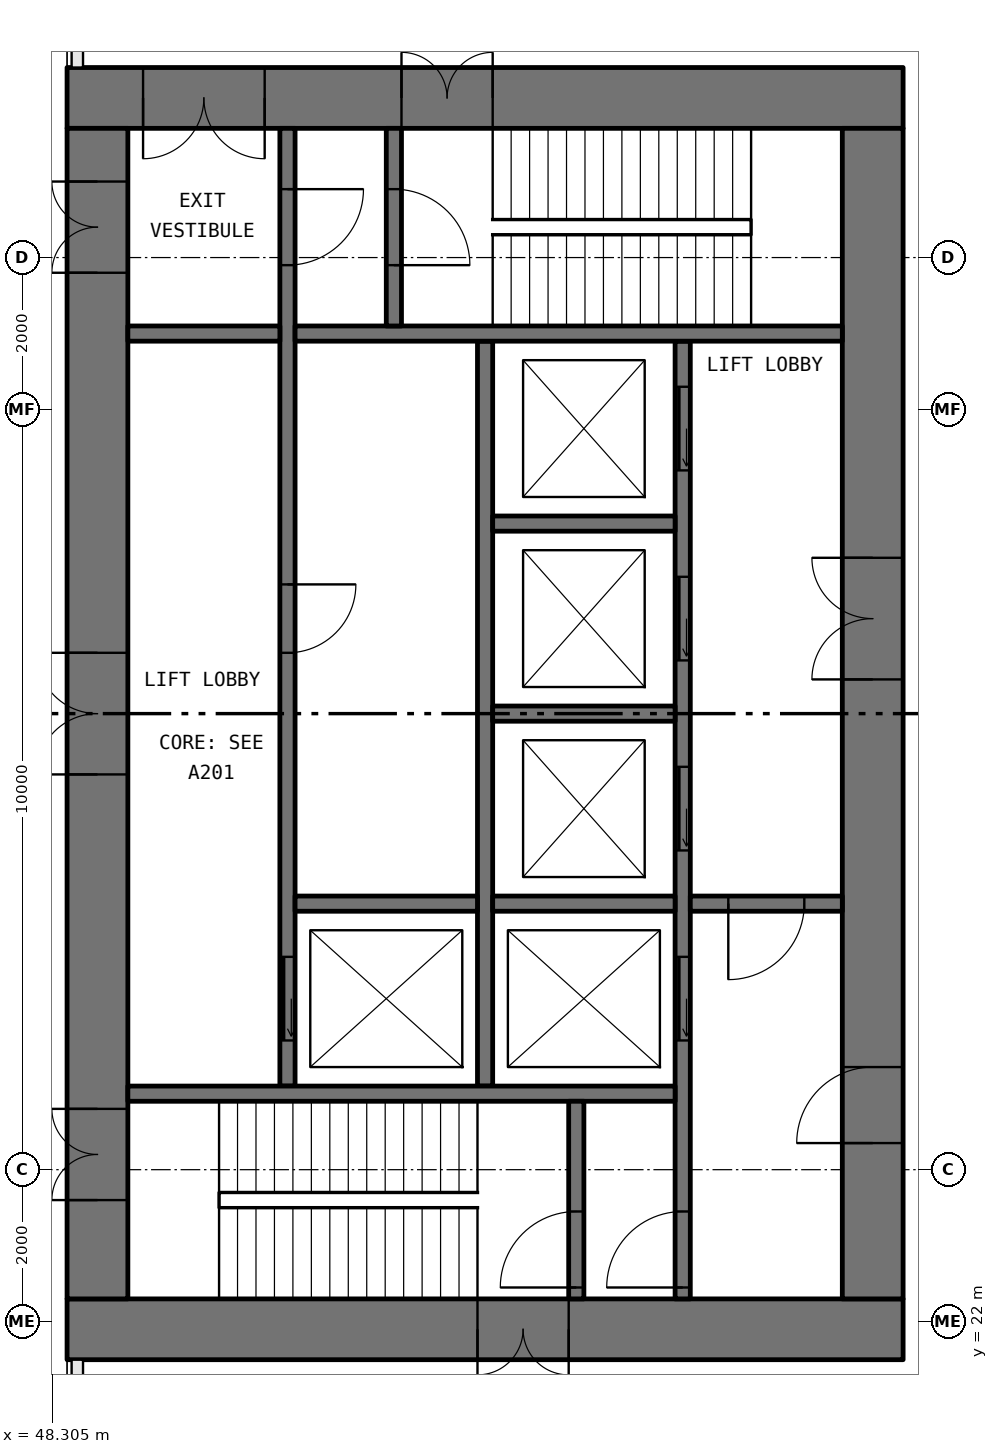
"""IFC4 building model, lengths in metres.
Left out: names, types, materials, properties, quantities, classifications, styles, units other than length and angle.
Written with IfcOpenShell. Run it as: python <this file> out.ifc"""

import sys

from ifc_helpers import new_model, si_unit, direction, frame, frame_2d, origin, place, context, subcontext, project, spatial, rectangle, extrude, element, fill, save


model = new_model("IFC4")
c1 = context("Model", 3, precision=1e-05, world=origin(), true_north=direction((0.0, 1.0)))
c2 = subcontext(c1, "Body", "Model", "MODEL_VIEW")
j1 = project(units=[si_unit("LENGTHUNIT", "METRE"), si_unit("PLANEANGLEUNIT", "RADIAN")], contexts=[c1])
p1 = place(None, origin())
s1 = spatial("IfcSite", under=j1, at=p1, CompositionType="ELEMENT")
p2 = place(p1, origin())
s2 = spatial("IfcBuilding", under=s1, at=p2, CompositionType="ELEMENT")
p3 = place(p2, origin())
s3 = spatial("IfcBuildingStorey", under=s2, at=p3, CompositionType="ELEMENT", Elevation=0.0)
p4 = place(p3, frame((59.5, 21.9, 0.0), z_axis=(0.0, 0.0, 1.0), x_axis=(-1.0, 0.0, 0.0)))
e1 = element("IfcWall", 1, at=p4, inside=s3, PredefinedType="SHEAR", context=c2, shape_type="SweptSolid", body=[
    extrude(rectangle(XDim=11.0, YDim=0.8, at=frame_2d((5.5, 0.0))), origin(), (0.0, 0.0, 1.0), 5.6),
])
p5 = place(p4, frame((4.4, 0.0, 0.0)))
e2 = element("IfcOpeningElement", 2, at=p5, cuts=e1, PredefinedType="OPENING", context=c2, shape_type="SweptSolid", body=[
    extrude(rectangle(XDim=1.2, YDim=2.1, at=frame_2d((0.6, 1.05))), frame((0.0, 0.41, 0.0), z_axis=(0.0, -1.0, 0.0), x_axis=(1.0, 0.0, 0.0)), (0.0, 0.0, 1.0), 0.82),
])
p6 = place(p3, frame((59.5, 38.1, 0.0), z_axis=(0.0, 0.0, 1.0), x_axis=(-1.0, 0.0, 0.0)))
e3 = element("IfcWall", 3, at=p6, inside=s3, PredefinedType="SHEAR", context=c2, shape_type="SweptSolid", body=[
    extrude(rectangle(XDim=11.0, YDim=0.8, at=frame_2d((5.5, 0.0))), origin(), (0.0, 0.0, 1.0), 5.6),
])
p7 = place(p6, frame((8.4, 0.0, 0.0)))
e4 = element("IfcOpeningElement", 4, at=p7, cuts=e3, PredefinedType="OPENING", context=c2, shape_type="SweptSolid", body=[
    extrude(rectangle(XDim=1.6, YDim=2.1, at=frame_2d((0.8, 1.05))), frame((0.0, 0.41, 0.0), z_axis=(0.0, -1.0, 0.0), x_axis=(1.0, 0.0, 0.0)), (0.0, 0.0, 1.0), 0.82),
])
p8 = place(p6, frame((5.4, 0.0, 0.0)))
e5 = element("IfcOpeningElement", 5, at=p8, cuts=e3, PredefinedType="OPENING", context=c2, shape_type="SweptSolid", body=[
    extrude(rectangle(XDim=1.2, YDim=2.1, at=frame_2d((0.6, 1.05))), frame((0.0, 0.41, 0.0), z_axis=(0.0, -1.0, 0.0), x_axis=(1.0, 0.0, 0.0)), (0.0, 0.0, 1.0), 0.82),
])
p9 = place(p3, frame((59.1, 22.3, 0.0), z_axis=(0.0, 0.0, 1.0), x_axis=(0.0, 1.0, 0.0)))
e6 = element("IfcWall", 6, at=p9, inside=s3, PredefinedType="SHEAR", context=c2, shape_type="SweptSolid", body=[
    extrude(rectangle(XDim=15.4, YDim=0.8, at=frame_2d((7.7, 0.0))), origin(), (0.0, 0.0, 1.0), 5.6),
])
p10 = place(p9, frame((8.15, 0.0, 0.0)))
e7 = element("IfcOpeningElement", 7, at=p10, cuts=e6, PredefinedType="OPENING", context=c2, shape_type="SweptSolid", body=[
    extrude(rectangle(XDim=1.6, YDim=2.1, at=frame_2d((0.8, 1.05))), frame((0.0, 0.41, 0.0), z_axis=(0.0, -1.0, 0.0), x_axis=(1.0, 0.0, 0.0)), (0.0, 0.0, 1.0), 0.82),
])
p11 = place(p9, frame((2.05, 0.0, 0.0)))
e8 = element("IfcOpeningElement", 8, at=p11, cuts=e6, PredefinedType="OPENING", context=c2, shape_type="SweptSolid", body=[
    extrude(rectangle(XDim=1.0, YDim=2.1, at=frame_2d((0.5, 1.05))), frame((0.0, 0.41, 0.0), z_axis=(0.0, -1.0, 0.0), x_axis=(1.0, 0.0, 0.0)), (0.0, 0.0, 1.0), 0.82),
])
p12 = place(p3, frame((48.9, 22.3, 0.0), z_axis=(0.0, 0.0, 1.0), x_axis=(0.0, 1.0, 0.0)))
e9 = element("IfcWall", 9, at=p12, inside=s3, PredefinedType="SHEAR", context=c2, shape_type="SweptSolid", body=[
    extrude(rectangle(XDim=15.4, YDim=0.8, at=frame_2d((7.7, 0.0))), origin(), (0.0, 0.0, 1.0), 5.6),
])
p13 = place(p12, frame((6.9, 0.0, 0.0)))
e10 = element("IfcOpeningElement", 10, at=p13, cuts=e9, PredefinedType="OPENING", context=c2, shape_type="SweptSolid", body=[
    extrude(rectangle(XDim=1.6, YDim=2.1, at=frame_2d((0.8, 1.05))), frame((0.0, 0.41, 0.0), z_axis=(0.0, -1.0, 0.0), x_axis=(1.0, 0.0, 0.0)), (0.0, 0.0, 1.0), 0.82),
])
p14 = place(p12, frame((1.3, 0.0, 0.0)))
e11 = element("IfcOpeningElement", 11, at=p14, cuts=e9, PredefinedType="OPENING", context=c2, shape_type="SweptSolid", body=[
    extrude(rectangle(XDim=1.2, YDim=2.1, at=frame_2d((0.6, 1.05))), frame((0.0, 0.41, 0.0), z_axis=(0.0, -1.0, 0.0), x_axis=(1.0, 0.0, 0.0)), (0.0, 0.0, 1.0), 0.82),
])
p15 = place(p12, frame((13.5, 0.0, 0.0)))
e12 = element("IfcOpeningElement", 12, at=p15, cuts=e9, PredefinedType="OPENING", context=c2, shape_type="SweptSolid", body=[
    extrude(rectangle(XDim=1.2, YDim=2.1, at=frame_2d((0.6, 1.05))), frame((0.0, 0.41, 0.0), z_axis=(0.0, -1.0, 0.0), x_axis=(1.0, 0.0, 0.0)), (0.0, 0.0, 1.0), 0.82),
])
p16 = place(p3, frame((56.6, 22.3, 0.0), z_axis=(0.0, 0.0, 1.0), x_axis=(0.0, 1.0, 0.0)))
e13 = element("IfcWall", 13, at=p16, inside=s3, PredefinedType="SOLIDWALL", context=c2, shape_type="SweptSolid", body=[
    extrude(rectangle(XDim=12.6, YDim=0.2, at=frame_2d((6.3, 0.0))), origin(), (0.0, 0.0, 1.0), 5.6),
])
p17 = place(p16, frame((3.4, 0.0, 0.0)))
e14 = element("IfcOpeningElement", 14, at=p17, cuts=e13, PredefinedType="OPENING", context=c2, shape_type="SweptSolid", body=[
    extrude(rectangle(XDim=1.1, YDim=2.1, at=frame_2d((0.55, 1.05))), frame((0.0, 0.11, 0.0), z_axis=(0.0, -1.0, 0.0), x_axis=(1.0, 0.0, 0.0)), (0.0, 0.0, 1.0), 0.22),
])
p18 = place(p16, frame((5.9, 0.0, 0.0)))
e15 = element("IfcOpeningElement", 15, at=p18, cuts=e13, PredefinedType="OPENING", context=c2, shape_type="SweptSolid", body=[
    extrude(rectangle(XDim=1.1, YDim=2.1, at=frame_2d((0.55, 1.05))), frame((0.0, 0.11, 0.0), z_axis=(0.0, -1.0, 0.0), x_axis=(1.0, 0.0, 0.0)), (0.0, 0.0, 1.0), 0.22),
])
p19 = place(p16, frame((8.4, 0.0, 0.0)))
e16 = element("IfcOpeningElement", 16, at=p19, cuts=e13, PredefinedType="OPENING", context=c2, shape_type="SweptSolid", body=[
    extrude(rectangle(XDim=1.1, YDim=2.1, at=frame_2d((0.55, 1.05))), frame((0.0, 0.11, 0.0), z_axis=(0.0, -1.0, 0.0), x_axis=(1.0, 0.0, 0.0)), (0.0, 0.0, 1.0), 0.22),
])
p20 = place(p16, frame((10.9, 0.0, 0.0)))
e17 = element("IfcOpeningElement", 17, at=p20, cuts=e13, PredefinedType="OPENING", context=c2, shape_type="SweptSolid", body=[
    extrude(rectangle(XDim=1.1, YDim=2.1, at=frame_2d((0.55, 1.05))), frame((0.0, 0.11, 0.0), z_axis=(0.0, -1.0, 0.0), x_axis=(1.0, 0.0, 0.0)), (0.0, 0.0, 1.0), 0.22),
])
p21 = place(p16, frame((0.15, 0.0, 0.0)))
e18 = element("IfcOpeningElement", 18, at=p21, cuts=e13, PredefinedType="OPENING", context=c2, shape_type="SweptSolid", body=[
    extrude(rectangle(XDim=1.0, YDim=2.1, at=frame_2d((0.5, 1.05))), frame((0.0, 0.11, 0.0), z_axis=(0.0, -1.0, 0.0), x_axis=(1.0, 0.0, 0.0)), (0.0, 0.0, 1.0), 0.22),
])
p22 = place(p3, frame((51.4, 25.1, 0.0), z_axis=(0.0, 0.0, 1.0), x_axis=(0.0, 1.0, 0.0)))
e19 = element("IfcWall", 19, at=p22, inside=s3, PredefinedType="SOLIDWALL", context=c2, shape_type="SweptSolid", body=[
    extrude(rectangle(XDim=12.6, YDim=0.2, at=frame_2d((6.3, 0.0))), origin(), (0.0, 0.0, 1.0), 5.6),
])
p23 = place(p22, frame((0.6, 0.0, 0.0)))
e20 = element("IfcOpeningElement", 20, at=p23, cuts=e19, PredefinedType="OPENING", context=c2, shape_type="SweptSolid", body=[
    extrude(rectangle(XDim=1.1, YDim=2.1, at=frame_2d((0.55, 1.05))), frame((0.0, 0.11, 0.0), z_axis=(0.0, -1.0, 0.0), x_axis=(1.0, 0.0, 0.0)), (0.0, 0.0, 1.0), 0.22),
])
p24 = place(p22, frame((10.8, 0.0, 0.0)))
e21 = element("IfcOpeningElement", 21, at=p24, cuts=e19, PredefinedType="OPENING", context=c2, shape_type="SweptSolid", body=[
    extrude(rectangle(XDim=1.0, YDim=2.1, at=frame_2d((0.5, 1.05))), frame((0.0, 0.11, 0.0), z_axis=(0.0, -1.0, 0.0), x_axis=(1.0, 0.0, 0.0)), (0.0, 0.0, 1.0), 0.22),
])
p25 = place(p22, frame((5.7, 0.0, 0.0)))
e22 = element("IfcOpeningElement", 22, at=p25, cuts=e19, PredefinedType="OPENING", context=c2, shape_type="SweptSolid", body=[
    extrude(rectangle(XDim=0.9, YDim=2.1, at=frame_2d((0.45, 1.05))), frame((0.0, 0.11, 0.0), z_axis=(0.0, -1.0, 0.0), x_axis=(1.0, 0.0, 0.0)), (0.0, 0.0, 1.0), 0.22),
])
p26 = place(p3, frame((54.0, 25.1, 0.0), z_axis=(0.0, 0.0, 1.0), x_axis=(0.0, 1.0, 0.0)))
e23 = element("IfcWall", 23, at=p26, inside=s3, PredefinedType="SOLIDWALL", context=c2, shape_type="SweptSolid", body=[
    extrude(rectangle(XDim=9.8, YDim=0.2, at=frame_2d((4.9, 0.0))), origin(), (0.0, 0.0, 1.0), 5.6),
])
for number, where, z_axis, x_axis in (
    (24, (56.5, 25.0, 0.0), (0.0, 0.0, 1.0), (-1.0, 0.0, 0.0)),
    (25, (58.7, 35.0, 0.0), (0.0, 0.0, 1.0), (-1.0, 0.0, 0.0)),
):
    element("IfcWall", number, at=place(p3, frame(where, z_axis=z_axis, x_axis=x_axis)), inside=s3, PredefinedType="SOLIDWALL", context=c2, shape_type="SweptSolid", body=[
        extrude(rectangle(XDim=7.2, YDim=0.2, at=frame_2d((3.6, 0.0))), origin(), (0.0, 0.0, 1.0), 5.6),
    ])
p27 = place(p3, frame((58.7, 27.5, 0.0), z_axis=(0.0, 0.0, 1.0), x_axis=(-1.0, 0.0, 0.0)))
e26 = element("IfcWall", 26, at=p27, inside=s3, PredefinedType="SOLIDWALL", context=c2, shape_type="SweptSolid", body=[
    extrude(rectangle(XDim=2.0, YDim=0.2, at=frame_2d((1.0, 0.0))), origin(), (0.0, 0.0, 1.0), 5.6),
])
p28 = place(p27, frame((0.5, 0.0, 0.0)))
e27 = element("IfcOpeningElement", 27, at=p28, cuts=e26, PredefinedType="OPENING", context=c2, shape_type="SweptSolid", body=[
    extrude(rectangle(XDim=1.0, YDim=2.1, at=frame_2d((0.5, 1.05))), frame((0.0, 0.11, 0.0), z_axis=(0.0, -1.0, 0.0), x_axis=(1.0, 0.0, 0.0)), (0.0, 0.0, 1.0), 0.22),
])
p29 = place(p3, frame((55.2, 22.3, 0.0), z_axis=(0.0, 0.0, 1.0), x_axis=(0.0, 1.0, 0.0)))
e28 = element("IfcWall", 28, at=p29, inside=s3, PredefinedType="SOLIDWALL", context=c2, shape_type="SweptSolid", body=[
    extrude(rectangle(XDim=2.6, YDim=0.2, at=frame_2d((1.3, 0.0))), origin(), (0.0, 0.0, 1.0), 5.6),
])
p30 = place(p29, frame((0.15, 0.0, 0.0)))
e29 = element("IfcOpeningElement", 29, at=p30, cuts=e28, PredefinedType="OPENING", context=c2, shape_type="SweptSolid", body=[
    extrude(rectangle(XDim=1.0, YDim=2.1, at=frame_2d((0.5, 1.05))), frame((0.0, 0.11, 0.0), z_axis=(0.0, -1.0, 0.0), x_axis=(1.0, 0.0, 0.0)), (0.0, 0.0, 1.0), 0.22),
])
p31 = place(p3, frame((52.8, 35.1, 0.0), z_axis=(0.0, 0.0, 1.0), x_axis=(0.0, 1.0, 0.0)))
e30 = element("IfcWall", 30, at=p31, inside=s3, PredefinedType="SOLIDWALL", context=c2, shape_type="SweptSolid", body=[
    extrude(rectangle(XDim=2.6, YDim=0.2, at=frame_2d((1.3, 0.0))), origin(), (0.0, 0.0, 1.0), 5.6),
])
p32 = place(p31, frame((0.8, 0.0, 0.0)))
e31 = element("IfcOpeningElement", 31, at=p32, cuts=e30, PredefinedType="OPENING", context=c2, shape_type="SweptSolid", body=[
    extrude(rectangle(XDim=1.0, YDim=2.1, at=frame_2d((0.5, 1.05))), frame((0.0, 0.11, 0.0), z_axis=(0.0, -1.0, 0.0), x_axis=(1.0, 0.0, 0.0)), (0.0, 0.0, 1.0), 0.22),
])
p33 = place(p3, frame((51.3, 35.0, 0.0), z_axis=(0.0, 0.0, 1.0), x_axis=(-1.0, 0.0, 0.0)))
e32 = element("IfcWall", 32, at=p33, inside=s3, PredefinedType="SOLIDWALL", context=c2, shape_type="SweptSolid", body=[
    extrude(rectangle(XDim=2.0, YDim=0.2, at=frame_2d((1.0, 0.0))), origin(), (0.0, 0.0, 1.0), 5.6),
])
for number, where, z_axis, x_axis in (
    (33, (56.5, 27.5, 0.0), (0.0, 0.0, 1.0), (-1.0, 0.0, 0.0)),
    (34, (56.5, 30.0, 0.0), (0.0, 0.0, 1.0), (-1.0, 0.0, 0.0)),
    (35, (56.5, 32.5, 0.0), (0.0, 0.0, 1.0), (-1.0, 0.0, 0.0)),
    (36, (53.9, 27.5, 0.0), (0.0, 0.0, 1.0), (-1.0, 0.0, 0.0)),
):
    element("IfcWall", number, at=place(p3, frame(where, z_axis=z_axis, x_axis=x_axis)), inside=s3, PredefinedType="SOLIDWALL", context=c2, shape_type="SweptSolid", body=[
        extrude(rectangle(XDim=2.4, YDim=0.2, at=frame_2d((1.2, 0.0))), origin(), (0.0, 0.0, 1.0), 5.6),
    ])
p34 = place(p23, origin())
e37 = element("IfcDoor", 37, at=p34, inside=s3, OperationType="SLIDING_TO_LEFT", PredefinedType="DOOR", context=c2, shape_type="SweptSolid", body=[
    extrude(rectangle(XDim=1.1, YDim=2.1, at=frame_2d((0.55, 1.05))), frame((0.0, 0.025, 0.0), z_axis=(0.0, -1.0, 0.0), x_axis=(1.0, 0.0, 0.0)), (0.0, 0.0, 1.0), 0.05),
])
fill(e20, e37)
p35 = place(p17, origin())
e38 = element("IfcDoor", 38, at=p35, inside=s3, OperationType="SLIDING_TO_LEFT", PredefinedType="DOOR", context=c2, shape_type="SweptSolid", body=[
    extrude(rectangle(XDim=1.1, YDim=2.1, at=frame_2d((0.55, 1.05))), frame((0.0, 0.025, 0.0), z_axis=(0.0, -1.0, 0.0), x_axis=(1.0, 0.0, 0.0)), (0.0, 0.0, 1.0), 0.05),
])
fill(e14, e38)
p36 = place(p18, origin())
e39 = element("IfcDoor", 39, at=p36, inside=s3, OperationType="SLIDING_TO_LEFT", PredefinedType="DOOR", context=c2, shape_type="SweptSolid", body=[
    extrude(rectangle(XDim=1.1, YDim=2.1, at=frame_2d((0.55, 1.05))), frame((0.0, 0.025, 0.0), z_axis=(0.0, -1.0, 0.0), x_axis=(1.0, 0.0, 0.0)), (0.0, 0.0, 1.0), 0.05),
])
fill(e15, e39)
p37 = place(p19, origin())
e40 = element("IfcDoor", 40, at=p37, inside=s3, OperationType="SLIDING_TO_LEFT", PredefinedType="DOOR", context=c2, shape_type="SweptSolid", body=[
    extrude(rectangle(XDim=1.1, YDim=2.1, at=frame_2d((0.55, 1.05))), frame((0.0, 0.025, 0.0), z_axis=(0.0, -1.0, 0.0), x_axis=(1.0, 0.0, 0.0)), (0.0, 0.0, 1.0), 0.05),
])
fill(e16, e40)
p38 = place(p20, origin())
e41 = element("IfcDoor", 41, at=p38, inside=s3, OperationType="SLIDING_TO_LEFT", PredefinedType="DOOR", context=c2, shape_type="SweptSolid", body=[
    extrude(rectangle(XDim=1.1, YDim=2.1, at=frame_2d((0.55, 1.05))), frame((0.0, 0.025, 0.0), z_axis=(0.0, -1.0, 0.0), x_axis=(1.0, 0.0, 0.0)), (0.0, 0.0, 1.0), 0.05),
])
fill(e17, e41)
p39 = place(p30, origin())
e42 = element("IfcDoor", 42, at=p39, inside=s3, OperationType="SINGLE_SWING_RIGHT", PredefinedType="DOOR", context=c2, shape_type="SweptSolid", body=[
    extrude(rectangle(XDim=1.0, YDim=2.1, at=frame_2d((0.5, 1.05))), frame((0.0, 0.025, 0.0), z_axis=(0.0, -1.0, 0.0), x_axis=(1.0, 0.0, 0.0)), (0.0, 0.0, 1.0), 0.05),
])
fill(e29, e42)
p40 = place(p21, origin())
e43 = element("IfcDoor", 43, at=p40, inside=s3, OperationType="SINGLE_SWING_RIGHT", PredefinedType="DOOR", context=c2, shape_type="SweptSolid", body=[
    extrude(rectangle(XDim=1.0, YDim=2.1, at=frame_2d((0.5, 1.05))), frame((0.0, 0.025, 0.0), z_axis=(0.0, -1.0, 0.0), x_axis=(1.0, 0.0, 0.0)), (0.0, 0.0, 1.0), 0.05),
])
fill(e18, e43)
p41 = place(p24, frame((1.0, 0.0, 0.0), x_axis=(-1.0, 0.0, 0.0)))
e44 = element("IfcDoor", 44, at=p41, inside=s3, OperationType="SINGLE_SWING_RIGHT", PredefinedType="DOOR", context=c2, shape_type="SweptSolid", body=[
    extrude(rectangle(XDim=1.0, YDim=2.1, at=frame_2d((0.5, 1.05))), frame((0.0, 0.025, 0.0), z_axis=(0.0, -1.0, 0.0), x_axis=(1.0, 0.0, 0.0)), (0.0, 0.0, 1.0), 0.05),
])
fill(e21, e44)
p42 = place(p32, frame((1.0, 0.0, 0.0), x_axis=(-1.0, 0.0, 0.0)))
e45 = element("IfcDoor", 45, at=p42, inside=s3, OperationType="SINGLE_SWING_LEFT", PredefinedType="DOOR", context=c2, shape_type="SweptSolid", body=[
    extrude(rectangle(XDim=1.0, YDim=2.1, at=frame_2d((0.5, 1.05))), frame((0.0, 0.025, 0.0), z_axis=(0.0, -1.0, 0.0), x_axis=(1.0, 0.0, 0.0)), (0.0, 0.0, 1.0), 0.05),
])
fill(e31, e45)
p43 = place(p28, origin())
e46 = element("IfcDoor", 46, at=p43, inside=s3, OperationType="SINGLE_SWING_LEFT", PredefinedType="DOOR", context=c2, shape_type="SweptSolid", body=[
    extrude(rectangle(XDim=1.0, YDim=2.1, at=frame_2d((0.5, 1.05))), frame((0.0, 0.025, 0.0), z_axis=(0.0, -1.0, 0.0), x_axis=(1.0, 0.0, 0.0)), (0.0, 0.0, 1.0), 0.05),
])
fill(e27, e46)
p44 = place(p10, origin())
e47 = element("IfcDoor", 47, at=p44, inside=s3, OperationType="DOUBLE_DOOR_SINGLE_SWING", PredefinedType="DOOR", context=c2, shape_type="SweptSolid", body=[
    extrude(rectangle(XDim=1.6, YDim=2.1, at=frame_2d((0.8, 1.05))), frame((0.0, 0.025, 0.0), z_axis=(0.0, -1.0, 0.0), x_axis=(1.0, 0.0, 0.0)), (0.0, 0.0, 1.0), 0.05),
])
fill(e7, e47)
p45 = place(p11, origin())
e48 = element("IfcDoor", 48, at=p45, inside=s3, OperationType="SINGLE_SWING_RIGHT", PredefinedType="DOOR", context=c2, shape_type="SweptSolid", body=[
    extrude(rectangle(XDim=1.0, YDim=2.1, at=frame_2d((0.5, 1.05))), frame((0.0, 0.025, 0.0), z_axis=(0.0, -1.0, 0.0), x_axis=(1.0, 0.0, 0.0)), (0.0, 0.0, 1.0), 0.05),
])
fill(e8, e48)
p46 = place(p7, origin())
e49 = element("IfcDoor", 49, at=p46, inside=s3, OperationType="DOUBLE_DOOR_SINGLE_SWING", PredefinedType="DOOR", context=c2, shape_type="SweptSolid", body=[
    extrude(rectangle(XDim=1.6, YDim=2.1, at=frame_2d((0.8, 1.05))), frame((0.0, 0.025, 0.0), z_axis=(0.0, -1.0, 0.0), x_axis=(1.0, 0.0, 0.0)), (0.0, 0.0, 1.0), 0.05),
])
fill(e4, e49)
p47 = place(p13, origin())
e50 = element("IfcDoor", 50, at=p47, inside=s3, OperationType="DOUBLE_DOOR_SINGLE_SWING", PredefinedType="DOOR", context=c2, shape_type="SweptSolid", body=[
    extrude(rectangle(XDim=1.6, YDim=2.1, at=frame_2d((0.8, 1.05))), frame((0.0, 0.025, 0.0), z_axis=(0.0, -1.0, 0.0), x_axis=(1.0, 0.0, 0.0)), (0.0, 0.0, 1.0), 0.05),
])
fill(e10, e50)
p48 = place(p5, origin())
e51 = element("IfcDoor", 51, at=p48, inside=s3, OperationType="DOUBLE_DOOR_SINGLE_SWING", PredefinedType="DOOR", context=c2, shape_type="SweptSolid", body=[
    extrude(rectangle(XDim=1.2, YDim=2.1, at=frame_2d((0.6, 1.05))), frame((0.0, 0.025, 0.0), z_axis=(0.0, -1.0, 0.0), x_axis=(1.0, 0.0, 0.0)), (0.0, 0.0, 1.0), 0.05),
])
fill(e2, e51)
p49 = place(p8, frame((1.2, 0.0, 0.0), x_axis=(-1.0, 0.0, 0.0)))
e52 = element("IfcDoor", 52, at=p49, inside=s3, OperationType="DOUBLE_DOOR_SINGLE_SWING", PredefinedType="DOOR", context=c2, shape_type="SweptSolid", body=[
    extrude(rectangle(XDim=1.2, YDim=2.1, at=frame_2d((0.6, 1.05))), frame((0.0, 0.025, 0.0), z_axis=(0.0, -1.0, 0.0), x_axis=(1.0, 0.0, 0.0)), (0.0, 0.0, 1.0), 0.05),
])
fill(e5, e52)
p50 = place(p14, origin())
e53 = element("IfcDoor", 53, at=p50, inside=s3, OperationType="DOUBLE_DOOR_SINGLE_SWING", PredefinedType="DOOR", context=c2, shape_type="SweptSolid", body=[
    extrude(rectangle(XDim=1.2, YDim=2.1, at=frame_2d((0.6, 1.05))), frame((0.0, 0.025, 0.0), z_axis=(0.0, -1.0, 0.0), x_axis=(1.0, 0.0, 0.0)), (0.0, 0.0, 1.0), 0.05),
])
fill(e11, e53)
p51 = place(p15, origin())
e54 = element("IfcDoor", 54, at=p51, inside=s3, OperationType="DOUBLE_DOOR_SINGLE_SWING", PredefinedType="DOOR", context=c2, shape_type="SweptSolid", body=[
    extrude(rectangle(XDim=1.2, YDim=2.1, at=frame_2d((0.6, 1.05))), frame((0.0, 0.025, 0.0), z_axis=(0.0, -1.0, 0.0), x_axis=(1.0, 0.0, 0.0)), (0.0, 0.0, 1.0), 0.05),
])
fill(e12, e54)
p52 = place(p25, frame((0.9, 0.0, 0.0), x_axis=(-1.0, 0.0, 0.0)))
e55 = element("IfcDoor", 55, at=p52, inside=s3, OperationType="SINGLE_SWING_RIGHT", PredefinedType="DOOR", context=c2, shape_type="SweptSolid", body=[
    extrude(rectangle(XDim=0.9, YDim=2.1, at=frame_2d((0.45, 1.05))), frame((0.0, 0.025, 0.0), z_axis=(0.0, -1.0, 0.0), x_axis=(1.0, 0.0, 0.0)), (0.0, 0.0, 1.0), 0.05),
])
fill(e22, e55)
save(model, sys.argv[1])
